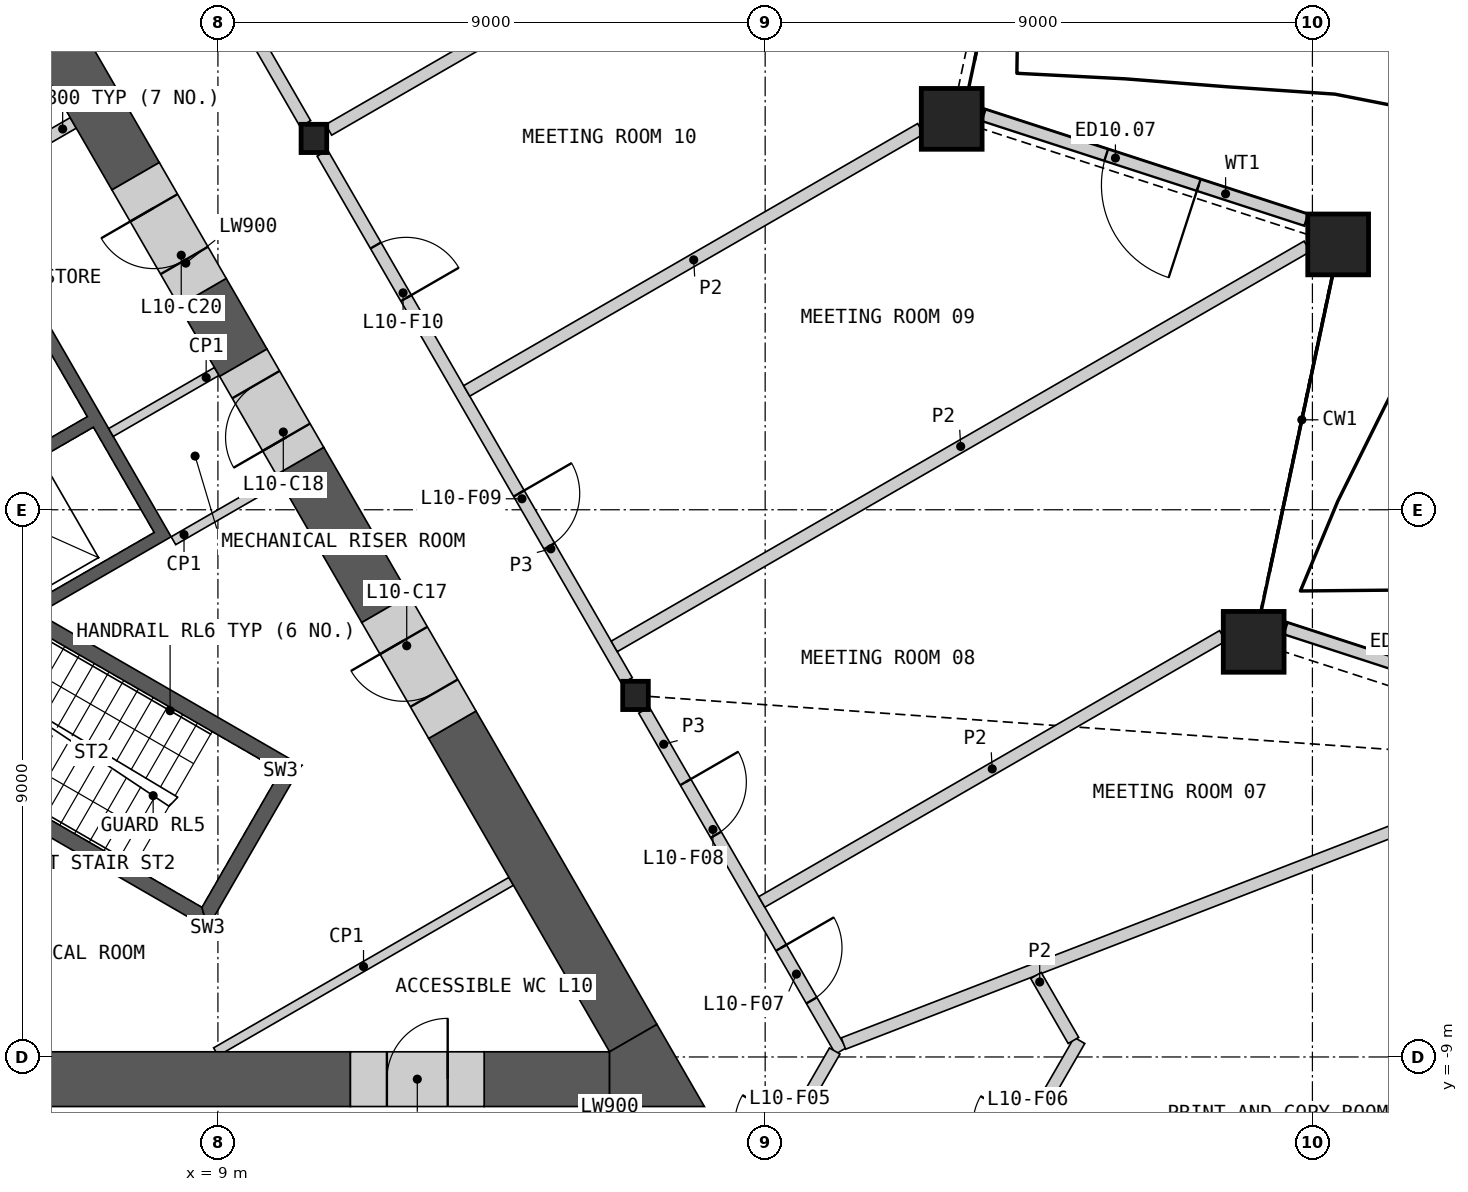
"""IFC4 building model, lengths in metres.
Left out: names, types, materials, properties, quantities, classifications, styles, units other than length and angle.
Written with IfcOpenShell. Run it as: python <this file> out.ifc"""

import sys

from ifc_helpers import new_model, si_unit, direction, frame, frame_2d, origin, origin_2d, place, context, subcontext, project, spatial, polyline, rectangle, hollow_rectangle, i_section, outline, extrude, element, fill, save


model = new_model("IFC4")
c1 = context("Model", 3, precision=1e-05, world=origin(), true_north=direction((0.0, 1.0)))
c2 = subcontext(c1, "Body", "Model", "MODEL_VIEW")
j1 = project(units=[si_unit("LENGTHUNIT", "METRE"), si_unit("PLANEANGLEUNIT", "RADIAN")], contexts=[c1])
p1 = place(None, origin())
s1 = spatial("IfcSite", under=j1, at=p1, CompositionType="ELEMENT")
p2 = place(p1, origin())
s2 = spatial("IfcBuilding", under=s1, at=p2, CompositionType="ELEMENT")
p3 = place(p2, frame((0.0, 0.0, 51.0)))
s3 = spatial("IfcBuildingStorey", under=s2, at=p3, CompositionType="ELEMENT", Elevation=51.0)
for number, where, z_axis, x_axis in (
    (1, (26.034, -2.172, 0.0), (0.0, 0.0, 1.0), (1.0, 0.0, 0.0)),
    (2, (27.423, 4.364, 0.0), (0.0, 0.0, 1.0), (1.0, 0.0, 0.0)),
    (3, (21.068, 6.429, 0.0), (0.0, 0.0, 1.0), (1.0, 0.0, 0.0)),
):
    element("IfcColumn", number, at=place(p3, frame(where, z_axis=z_axis, x_axis=x_axis)), inside=s3, PredefinedType="COLUMN", context=c2, shape_type="SweptSolid", body=[
        extrude(hollow_rectangle(XDim=1.0, YDim=1.0, WallThickness=0.07, at=origin_2d()), origin(), (0.0, 0.0, 1.0), 4.2),
    ])
for number, where, z_axis, x_axis in (
    (4, (15.868, -3.054, 0.0), (0.0, 0.0, 1.0), (1.0, 0.0, 0.0)),
    (5, (10.578, 6.107, 0.0), (0.0, 0.0, 1.0), (1.0, 0.0, 0.0)),
):
    element("IfcColumn", number, at=place(p3, frame(where, z_axis=z_axis, x_axis=x_axis)), inside=s3, PredefinedType="COLUMN", context=c2, shape_type="SweptSolid", body=[
        extrude(i_section(OverallWidth=0.421, OverallDepth=0.465, WebThickness=0.045, FlangeThickness=0.072, at=origin_2d()), origin(), (0.0, 0.0, 1.0), 4.2),
    ])
p4 = place(p3, frame((31.914, -3.693, 0.0), z_axis=(0.0, 0.0, 1.0), x_axis=(-0.951049360908, 0.309039015525, 0.0)))
e6 = element("IfcWall", 6, at=p4, inside=s3, PredefinedType="SOLIDWALL", context=c2, shape_type="SweptSolid", body=[
    extrude(rectangle(XDim=5.631, YDim=0.2, at=frame_2d((2.815, 0.0))), origin(), (0.0, 0.0, 1.0), 3.189),
])
p5 = place(p4, frame((2.031, 0.0, 0.0)))
e7 = element("IfcOpeningElement", 7, at=p5, cuts=e6, PredefinedType="OPENING", context=c2, shape_type="SweptSolid", body=[
    extrude(rectangle(XDim=1.6, YDim=2.4, at=frame_2d((0.8, 1.2))), frame((0.0, 0.11, 0.0), z_axis=(0.0, -1.0, 0.0), x_axis=(1.0, 0.0, 0.0)), (0.0, 0.0, 1.0), 0.22),
])
p6 = place(p3, frame((26.899, 4.765, 0.0), z_axis=(0.0, 0.0, 1.0), x_axis=(-0.951054004345, 0.309024725255, 0.0)))
e8 = element("IfcWall", 8, at=p6, inside=s3, PredefinedType="SOLIDWALL", context=c2, shape_type="SweptSolid", body=[
    extrude(rectangle(XDim=5.579, YDim=0.2, at=frame_2d((2.79, 0.0))), origin(), (0.0, 0.0, 1.0), 3.189),
])
p7 = place(p6, frame((1.86, 0.0, 0.0)))
e9 = element("IfcOpeningElement", 9, at=p7, cuts=e8, PredefinedType="OPENING", context=c2, shape_type="SweptSolid", body=[
    extrude(rectangle(XDim=1.6, YDim=2.4, at=frame_2d((0.8, 1.2))), frame((0.0, 0.11, 0.0), z_axis=(0.0, -1.0, 0.0), x_axis=(1.0, 0.0, 0.0)), (0.0, 0.0, 1.0), 0.22),
])
p8 = place(p3, origin())
e10 = element("IfcWall", 10, at=p8, inside=s3, PredefinedType="SHEAR", context=c2, shape_type="SweptSolid", body=[
    extrude(outline(polyline([(2.66, 4.192), (4.831, 5.445), (8.231, -0.444), (6.061, -1.697), (5.96, -1.524), (7.952, -0.374), (6.952, 1.358), (4.96, 0.208), (4.861, 0.381), (6.852, 1.531), (5.852, 3.263), (3.861, 2.113), (3.76, 2.287), (5.752, 3.437), (4.752, 5.169), (2.76, 4.019), (2.66, 4.192)])), origin(), (0.0, 0.0, 1.0), 3.8),
])
p9 = place(p3, frame((4.881, 5.358, 0.0), z_axis=(0.0, 0.0, 1.0), x_axis=(0.866035824272, 0.499981950752, 0.0)))
e11 = element("IfcWall", 11, at=p9, inside=s3, PredefinedType="SHEAR", context=c2, shape_type="SweptSolid", body=[
    extrude(rectangle(XDim=2.009, YDim=0.2, at=frame_2d((1.004, 0.0))), origin(), (0.0, 0.0, 1.0), 3.8),
])
p10 = place(p3, origin())
e12 = element("IfcWall", 12, at=p10, inside=s3, PredefinedType="SHEAR", context=c2, shape_type="SweptSolid", body=[
    extrude(outline(polyline([(3.763, -3.956), (8.83, -6.881), (8.738, -6.539), (3.888, -3.739), (3.763, -3.956)])), origin(), (0.0, 0.0, 1.0), 3.8),
])
p11 = place(p3, origin())
e13 = element("IfcWall", 13, at=p11, inside=s3, PredefinedType="SHEAR", context=c2, shape_type="SweptSolid", body=[
    extrude(outline(polyline([(8.83, -6.881), (10.374, -4.206), (10.032, -4.298), (8.738, -6.539), (8.83, -6.881)])), origin(), (0.0, 0.0, 1.0), 3.8),
])
p12 = place(p3, origin())
e14 = element("IfcWall", 14, at=p12, inside=s3, PredefinedType="SHEAR", context=c2, shape_type="SweptSolid", body=[
    extrude(outline(polyline([(10.032, -4.298), (10.374, -4.206), (5.307, -1.281), (5.182, -1.498), (10.032, -4.298)])), origin(), (0.0, 0.0, 1.0), 3.8),
])
p13 = place(p3, frame((8.268, -0.509, 0.0), z_axis=(0.0, 0.0, 1.0), x_axis=(0.866035824272, 0.499981950752, 0.0)))
e15 = element("IfcWall", 15, at=p13, inside=s3, PredefinedType="PARTITIONING", context=c2, shape_type="SweptSolid", body=[
    extrude(rectangle(XDim=2.009, YDim=0.15, at=frame_2d((1.004, 0.0))), origin(), (0.0, 0.0, 1.0), 3.8),
])
p14 = place(p3, frame((13.823, -6.111, 0.0), z_axis=(0.0, 0.0, 1.0), x_axis=(-0.866026802741, -0.499997576928, 0.0)))
e16 = element("IfcWall", 16, at=p14, inside=s3, PredefinedType="PARTITIONING", context=c2, shape_type="SweptSolid", body=[
    extrude(rectangle(XDim=5.607, YDim=0.15, at=frame_2d((2.804, 0.0))), origin(), (0.0, 0.0, 1.0), 3.8),
])
p15 = place(p3, frame((8.981, 2.275, 0.0), z_axis=(0.0, 0.0, 1.0), x_axis=(-0.866013584312, -0.500020471368, 0.0)))
e17 = element("IfcWall", 17, at=p15, inside=s3, PredefinedType="PARTITIONING", context=c2, shape_type="SweptSolid", body=[
    extrude(rectangle(XDim=2.009, YDim=0.15, at=frame_2d((1.005, 0.0))), origin(), (0.0, 0.0, 1.0), 3.8),
])
p16 = place(p3, frame((-4.371, -9.365, 0.0), z_axis=(0.0, 0.0, 1.0), x_axis=(1.0, 0.0, 0.0)))
e18 = element("IfcWall", 18, at=p16, inside=s3, PredefinedType="SHEAR", context=c2, shape_type="SweptSolid", body=[
    extrude(rectangle(XDim=15.55, YDim=0.9, at=frame_2d((7.775, 0.0))), origin(), (0.0, 0.0, 1.0), 3.8),
])
p17 = place(p3, frame((13.379, -9.365, 0.0), z_axis=(0.0, 0.0, 1.0), x_axis=(1.0, 0.0, 0.0)))
e19 = element("IfcWall", 19, at=p17, inside=s3, PredefinedType="SHEAR", context=c2, shape_type="SweptSolid", body=[
    extrude(rectangle(XDim=2.062, YDim=0.9, at=frame_2d((1.031, 0.0))), origin(), (0.0, 0.0, 1.0), 3.8),
])
p18 = place(p3, frame((15.831, -8.69, 0.0), z_axis=(0.0, 0.0, 1.0), x_axis=(-0.499999419053, 0.866025739194, 0.0)))
e20 = element("IfcWall", 20, at=p18, inside=s3, PredefinedType="SHEAR", context=c2, shape_type="SweptSolid", body=[
    extrude(rectangle(XDim=5.952, YDim=0.9, at=frame_2d((2.976, 0.0))), origin(), (0.0, 0.0, 1.0), 3.8),
])
p19 = place(p3, frame((7.646, 5.486, 0.0), z_axis=(0.0, 0.0, 1.0), x_axis=(-0.499978218965, 0.866037978706, 0.0)))
e21 = element("IfcWall", 21, at=p19, inside=s3, PredefinedType="SHEAR", context=c2, shape_type="SweptSolid", body=[
    extrude(rectangle(XDim=4.076, YDim=0.9, at=frame_2d((2.038, 0.0))), origin(), (0.0, 0.0, 1.0), 3.8),
])
p20 = place(p3, frame((11.755, -1.63, 0.0), z_axis=(0.0, 0.0, 1.0), x_axis=(-0.499943114462, 0.866058244174, 0.0)))
e22 = element("IfcWall", 22, at=p20, inside=s3, PredefinedType="SHEAR", context=c2, shape_type="SweptSolid", body=[
    extrude(rectangle(XDim=2.809, YDim=0.9, at=frame_2d((1.405, 0.0))), origin(), (0.0, 0.0, 1.0), 3.8),
])
p21 = place(p3, frame((9.418, 2.418, 0.0), z_axis=(0.0, 0.0, 1.0), x_axis=(-0.49995335277, 0.8660523339, 0.0)))
e23 = element("IfcWall", 23, at=p21, inside=s3, PredefinedType="SHEAR", context=c2, shape_type="SweptSolid", body=[
    extrude(rectangle(XDim=1.343, YDim=0.9, at=frame_2d((0.671, 0.0))), origin(), (0.0, 0.0, 1.0), 3.8),
])
p22 = place(p3, origin())
e24 = element("IfcWall", 24, at=p22, inside=s3, PredefinedType="SHEAR", context=c2, shape_type="SweptSolid", body=[
    extrude(outline(polyline([(15.441, -9.815), (15.441, -8.915), (16.221, -8.465), (17.0, -9.815), (15.441, -9.815)])), origin(), (0.0, 0.0, 1.0), 3.8),
])
p23 = place(p3, frame((11.179, -9.365, 0.0), z_axis=(0.0, 0.0, 1.0), x_axis=(1.0, 0.0, 0.0)))
e25 = element("IfcWall", 25, at=p23, inside=s3, PredefinedType="SHEAR", context=c2, shape_type="SweptSolid", body=[
    extrude(rectangle(XDim=2.2, YDim=0.9, at=frame_2d((1.1, 0.0))), origin(), (0.0, 0.0, 1.0), 3.8),
])
p24 = place(p23, frame((0.6, 0.0, 0.0)))
e26 = element("IfcOpeningElement", 26, at=p24, cuts=e25, PredefinedType="OPENING", context=c2, shape_type="SweptSolid", body=[
    extrude(rectangle(XDim=1.0, YDim=2.1, at=frame_2d((0.5, 1.05))), frame((0.0, 0.46, 0.0), z_axis=(0.0, -1.0, 0.0), x_axis=(1.0, 0.0, 0.0)), (0.0, 0.0, 1.0), 0.92),
])
p25 = place(p3, frame((12.855, -3.536, 0.0), z_axis=(0.0, 0.0, 1.0), x_axis=(-0.50002983664, 0.866008176907, 0.0)))
e27 = element("IfcWall", 27, at=p25, inside=s3, PredefinedType="SHEAR", context=c2, shape_type="SweptSolid", body=[
    extrude(rectangle(XDim=2.2, YDim=0.9, at=frame_2d((1.1, 0.0))), origin(), (0.0, 0.0, 1.0), 3.8),
])
p26 = place(p25, frame((0.6, 0.0, 0.0)))
e28 = element("IfcOpeningElement", 28, at=p26, cuts=e27, PredefinedType="OPENING", context=c2, shape_type="SweptSolid", body=[
    extrude(rectangle(XDim=1.0, YDim=2.1, at=frame_2d((0.5, 1.05))), frame((0.0, 0.46, 0.0), z_axis=(0.0, -1.0, 0.0), x_axis=(1.0, 0.0, 0.0)), (0.0, 0.0, 1.0), 0.92),
])
p27 = place(p3, frame((10.35, 0.803, 0.0), z_axis=(0.0, 0.0, 1.0), x_axis=(-0.500081290722, 0.865978465477, 0.0)))
e29 = element("IfcWall", 29, at=p27, inside=s3, PredefinedType="SHEAR", context=c2, shape_type="SweptSolid", body=[
    extrude(rectangle(XDim=1.865, YDim=0.9, at=frame_2d((0.933, 0.0))), origin(), (0.0, 0.0, 1.0), 3.8),
])
p28 = place(p27, frame((0.45, 0.0, 0.0)))
e30 = element("IfcOpeningElement", 30, at=p28, cuts=e29, PredefinedType="OPENING", context=c2, shape_type="SweptSolid", body=[
    extrude(rectangle(XDim=1.0, YDim=2.1, at=frame_2d((0.5, 1.05))), frame((0.0, 0.46, 0.0), z_axis=(0.0, -1.0, 0.0), x_axis=(1.0, 0.0, 0.0)), (0.0, 0.0, 1.0), 0.92),
])
p29 = place(p3, frame((8.747, 3.58, 0.0), z_axis=(0.0, 0.0, 1.0), x_axis=(-0.50002983664, 0.866008176907, 0.0)))
e31 = element("IfcWall", 31, at=p29, inside=s3, PredefinedType="SHEAR", context=c2, shape_type="SweptSolid", body=[
    extrude(rectangle(XDim=2.2, YDim=0.9, at=frame_2d((1.1, 0.0))), origin(), (0.0, 0.0, 1.0), 3.8),
])
p30 = place(p29, frame((0.6, 0.0, 0.0)))
e32 = element("IfcOpeningElement", 32, at=p30, cuts=e31, PredefinedType="OPENING", context=c2, shape_type="SweptSolid", body=[
    extrude(rectangle(XDim=1.0, YDim=2.1, at=frame_2d((0.5, 1.05))), frame((0.0, 0.46, 0.0), z_axis=(0.0, -1.0, 0.0), x_axis=(1.0, 0.0, 0.0)), (0.0, 0.0, 1.0), 0.92),
])
p31 = place(p3, frame((10.719, 5.865, 0.0), z_axis=(0.0, 0.0, 1.0), x_axis=(0.49999175339, -0.866030164915, 0.0)))
e33 = element("IfcWall", 33, at=p31, inside=s3, PredefinedType="PARTITIONING", context=c2, shape_type="SweptSolid", body=[
    extrude(rectangle(XDim=10.019, YDim=0.2, at=frame_2d((5.009, 0.0))), origin(), (0.0, 0.0, 1.0), 3.8),
])
p32 = place(p31, frame((6.464, 0.0, 0.0)))
e34 = element("IfcOpeningElement", 34, at=p32, cuts=e33, PredefinedType="OPENING", context=c2, shape_type="SweptSolid", body=[
    extrude(rectangle(XDim=1.0, YDim=2.1, at=frame_2d((0.5, 1.05))), frame((0.0, 0.11, 0.0), z_axis=(0.0, -1.0, 0.0), x_axis=(1.0, 0.0, 0.0)), (0.0, 0.0, 1.0), 0.22),
])
p33 = place(p31, frame((1.753, 0.0, 0.0)))
e35 = element("IfcOpeningElement", 35, at=p33, cuts=e33, PredefinedType="OPENING", context=c2, shape_type="SweptSolid", body=[
    extrude(rectangle(XDim=1.0, YDim=2.1, at=frame_2d((0.5, 1.05))), frame((0.0, 0.11, 0.0), z_axis=(0.0, -1.0, 0.0), x_axis=(1.0, 0.0, 0.0)), (0.0, 0.0, 1.0), 0.22),
])
p34 = place(p3, frame((5.429, 15.026, 0.0), z_axis=(0.0, 0.0, 1.0), x_axis=(0.50001002959, -0.86601961312, 0.0)))
e36 = element("IfcWall", 36, at=p34, inside=s3, PredefinedType="PARTITIONING", context=c2, shape_type="SweptSolid", body=[
    extrude(rectangle(XDim=10.019, YDim=0.2, at=frame_2d((5.009, 0.0))), origin(), (0.0, 0.0, 1.0), 3.8),
])
p35 = place(p34, frame((4.86, 0.0, 0.0)))
e37 = element("IfcOpeningElement", 37, at=p35, cuts=e36, PredefinedType="OPENING", context=c2, shape_type="SweptSolid", body=[
    extrude(rectangle(XDim=1.0, YDim=2.1, at=frame_2d((0.5, 1.05))), frame((0.0, 0.11, 0.0), z_axis=(0.0, -1.0, 0.0), x_axis=(1.0, 0.0, 0.0)), (0.0, 0.0, 1.0), 0.22),
])
p36 = place(p3, frame((16.008, -3.296, 0.0), z_axis=(0.0, 0.0, 1.0), x_axis=(0.499984737558, -0.86603421538, 0.0)))
e38 = element("IfcWall", 38, at=p36, inside=s3, PredefinedType="PARTITIONING", context=c2, shape_type="SweptSolid", body=[
    extrude(rectangle(XDim=6.473, YDim=0.2, at=frame_2d((3.236, 0.0))), origin(), (0.0, 0.0, 1.0), 3.8),
])
p37 = place(p36, frame((4.512, 0.0, 0.0)))
e39 = element("IfcOpeningElement", 39, at=p37, cuts=e38, PredefinedType="OPENING", context=c2, shape_type="SweptSolid", body=[
    extrude(rectangle(XDim=1.0, YDim=2.1, at=frame_2d((0.5, 1.05))), frame((0.0, 0.11, 0.0), z_axis=(0.0, -1.0, 0.0), x_axis=(1.0, 0.0, 0.0)), (0.0, 0.0, 1.0), 0.22),
])
p38 = place(p36, frame((1.366, 0.0, 0.0)))
e40 = element("IfcOpeningElement", 40, at=p38, cuts=e38, PredefinedType="OPENING", context=c2, shape_type="SweptSolid", body=[
    extrude(rectangle(XDim=1.0, YDim=2.1, at=frame_2d((0.5, 1.05))), frame((0.0, 0.11, 0.0), z_axis=(0.0, -1.0, 0.0), x_axis=(1.0, 0.0, 0.0)), (0.0, 0.0, 1.0), 0.22),
])
p39 = place(p3, frame((17.281, -12.128, 0.0), z_axis=(0.0, 0.0, 1.0), x_axis=(0.499958791762, 0.866049194065, 0.0)))
e41 = element("IfcWall", 41, at=p39, inside=s3, PredefinedType="PARTITIONING", context=c2, shape_type="SweptSolid", body=[
    extrude(rectangle(XDim=3.726, YDim=0.2, at=frame_2d((1.863, 0.0))), origin(), (0.0, 0.0, 1.0), 3.8),
])
p40 = place(p39, frame((1.388, 0.0, 0.0)))
e42 = element("IfcOpeningElement", 42, at=p40, cuts=e41, PredefinedType="OPENING", context=c2, shape_type="SweptSolid", body=[
    extrude(rectangle(XDim=0.95, YDim=2.1, at=frame_2d((0.475, 1.05))), frame((0.0, 0.11, 0.0), z_axis=(0.0, -1.0, 0.0), x_axis=(1.0, 0.0, 0.0)), (0.0, 0.0, 1.0), 0.22),
])
p41 = place(p3, frame((19.287, -8.779, 0.0), z_axis=(0.0, 0.0, 1.0), x_axis=(0.932669586354, 0.360731815467, 0.0)))
e43 = element("IfcWall", 43, at=p41, inside=s3, PredefinedType="PARTITIONING", context=c2, shape_type="SweptSolid", body=[
    extrude(rectangle(XDim=13.501, YDim=0.2, at=frame_2d((6.75, 0.0))), origin(), (0.0, 0.0, 1.0), 2.885),
])
p42 = place(p3, frame((15.518, -2.248, 0.0), z_axis=(0.0, 0.0, 1.0), x_axis=(0.866025231175, 0.500000298968, 0.0)))
e44 = element("IfcWall", 44, at=p42, inside=s3, PredefinedType="PARTITIONING", context=c2, shape_type="SweptSolid", body=[
    extrude(rectangle(XDim=13.159, YDim=0.2, at=frame_2d((6.579, 0.0))), origin(), (0.0, 0.0, 1.0), 2.885),
])
p43 = place(p3, frame((10.821, 6.247, 0.0), z_axis=(0.0, 0.0, 1.0), x_axis=(0.866026729935, 0.499997703033, 0.0)))
e45 = element("IfcWall", 45, at=p43, inside=s3, PredefinedType="PARTITIONING", context=c2, shape_type="SweptSolid", body=[
    extrude(rectangle(XDim=12.848, YDim=0.2, at=frame_2d((6.424, 0.0))), origin(), (0.0, 0.0, 1.0), 2.885),
])
p44 = place(p3, frame((17.944, -6.45, 0.0), z_axis=(0.0, 0.0, 1.0), x_axis=(0.866025328989, 0.50000012955, 0.0)))
e46 = element("IfcWall", 46, at=p44, inside=s3, PredefinedType="PARTITIONING", context=c2, shape_type="SweptSolid", body=[
    extrude(rectangle(XDim=8.752, YDim=0.2, at=frame_2d((4.376, 0.0))), origin(), (0.0, 0.0, 1.0), 2.885),
])
p45 = place(p3, frame((13.091, 1.955, 0.0), z_axis=(0.0, 0.0, 1.0), x_axis=(0.866026670206, 0.499997806488, 0.0)))
e47 = element("IfcWall", 47, at=p45, inside=s3, PredefinedType="PARTITIONING", context=c2, shape_type="SweptSolid", body=[
    extrude(rectangle(XDim=8.622, YDim=0.2, at=frame_2d((4.311, 0.0))), origin(), (0.0, 0.0, 1.0), 2.885),
])
p46 = place(p3, frame((21.297, -11.973, 0.0), z_axis=(0.0, 0.0, 1.0), x_axis=(0.500008291124, 0.866020616849, 0.0)))
e48 = element("IfcWall", 48, at=p46, inside=s3, PredefinedType="PARTITIONING", context=c2, shape_type="SweptSolid", body=[
    extrude(rectangle(XDim=3.746, YDim=0.2, at=frame_2d((1.873, 0.0))), origin(), (0.0, 0.0, 1.0), 2.885),
])
p47 = place(p46, frame((1.189, 0.0, 0.0)))
e49 = element("IfcOpeningElement", 49, at=p47, cuts=e48, PredefinedType="OPENING", context=c2, shape_type="SweptSolid", body=[
    extrude(rectangle(XDim=0.95, YDim=2.1, at=frame_2d((0.475, 1.05))), frame((0.0, 0.11, 0.0), z_axis=(0.0, -1.0, 0.0), x_axis=(1.0, 0.0, 0.0)), (0.0, 0.0, 1.0), 0.22),
])
p48 = place(p3, frame((22.453, -7.66, 0.0), z_axis=(0.0, 0.0, 1.0), x_axis=(0.499928040405, -0.86606694569, 0.0)))
e50 = element("IfcWall", 50, at=p48, inside=s3, PredefinedType="PARTITIONING", context=c2, shape_type="SweptSolid", body=[
    extrude(rectangle(XDim=1.234, YDim=0.2, at=frame_2d((0.617, 0.0))), origin(), (0.0, 0.0, 1.0), 2.885),
])
p49 = place(p7, origin())
e51 = element("IfcDoor", 51, at=p49, inside=s3, OperationType="DOUBLE_DOOR_SINGLE_SWING", PredefinedType="DOOR", context=c2, shape_type="SweptSolid", body=[
    extrude(rectangle(XDim=1.6, YDim=2.4, at=frame_2d((0.8, 1.2))), frame((0.0, 0.025, 0.0), z_axis=(0.0, -1.0, 0.0), x_axis=(1.0, 0.0, 0.0)), (0.0, 0.0, 1.0), 0.05),
])
fill(e9, e51)
p50 = place(p24, origin())
e52 = element("IfcDoor", 52, at=p50, inside=s3, OperationType="SINGLE_SWING_RIGHT", PredefinedType="DOOR", context=c2, shape_type="SweptSolid", body=[
    extrude(rectangle(XDim=1.0, YDim=2.1, at=frame_2d((0.5, 1.05))), frame((0.0, 0.205, 0.0), z_axis=(0.0, -1.0, 0.0), x_axis=(1.0, 0.0, 0.0)), (0.0, 0.0, 1.0), 0.05),
])
fill(e26, e52)
p51 = place(p26, origin())
e53 = element("IfcDoor", 53, at=p51, inside=s3, OperationType="SINGLE_SWING_RIGHT", PredefinedType="DOOR", context=c2, shape_type="SweptSolid", body=[
    extrude(rectangle(XDim=1.0, YDim=2.1, at=frame_2d((0.5, 1.05))), frame((0.0, 0.205, 0.0), z_axis=(0.0, -1.0, 0.0), x_axis=(1.0, 0.0, 0.0)), (0.0, 0.0, 1.0), 0.05),
])
fill(e28, e53)
p52 = place(p28, origin())
e54 = element("IfcDoor", 54, at=p52, inside=s3, OperationType="SINGLE_SWING_LEFT", PredefinedType="DOOR", context=c2, shape_type="SweptSolid", body=[
    extrude(rectangle(XDim=1.0, YDim=2.1, at=frame_2d((0.5, 1.05))), frame((0.0, 0.205, 0.0), z_axis=(0.0, -1.0, 0.0), x_axis=(1.0, 0.0, 0.0)), (0.0, 0.0, 1.0), 0.05),
])
fill(e30, e54)
p53 = place(p30, origin())
e55 = element("IfcDoor", 55, at=p53, inside=s3, OperationType="SINGLE_SWING_RIGHT", PredefinedType="DOOR", context=c2, shape_type="SweptSolid", body=[
    extrude(rectangle(XDim=1.0, YDim=2.1, at=frame_2d((0.5, 1.05))), frame((0.0, 0.205, 0.0), z_axis=(0.0, -1.0, 0.0), x_axis=(1.0, 0.0, 0.0)), (0.0, 0.0, 1.0), 0.05),
])
fill(e32, e55)
p54 = place(p37, origin())
e56 = element("IfcDoor", 56, at=p54, inside=s3, OperationType="SINGLE_SWING_LEFT", PredefinedType="DOOR", context=c2, shape_type="SweptSolid", body=[
    extrude(rectangle(XDim=1.0, YDim=2.1, at=frame_2d((0.5, 1.05))), frame((0.0, 0.025, 0.0), z_axis=(0.0, -1.0, 0.0), x_axis=(1.0, 0.0, 0.0)), (0.0, 0.0, 1.0), 0.05),
])
fill(e39, e56)
p55 = place(p38, origin())
e57 = element("IfcDoor", 57, at=p55, inside=s3, OperationType="SINGLE_SWING_LEFT", PredefinedType="DOOR", context=c2, shape_type="SweptSolid", body=[
    extrude(rectangle(XDim=1.0, YDim=2.1, at=frame_2d((0.5, 1.05))), frame((0.0, 0.025, 0.0), z_axis=(0.0, -1.0, 0.0), x_axis=(1.0, 0.0, 0.0)), (0.0, 0.0, 1.0), 0.05),
])
fill(e40, e57)
p56 = place(p32, origin())
e58 = element("IfcDoor", 58, at=p56, inside=s3, OperationType="SINGLE_SWING_LEFT", PredefinedType="DOOR", context=c2, shape_type="SweptSolid", body=[
    extrude(rectangle(XDim=1.0, YDim=2.1, at=frame_2d((0.5, 1.05))), frame((0.0, 0.025, 0.0), z_axis=(0.0, -1.0, 0.0), x_axis=(1.0, 0.0, 0.0)), (0.0, 0.0, 1.0), 0.05),
])
fill(e34, e58)
p57 = place(p33, origin())
e59 = element("IfcDoor", 59, at=p57, inside=s3, OperationType="SINGLE_SWING_RIGHT", PredefinedType="DOOR", context=c2, shape_type="SweptSolid", body=[
    extrude(rectangle(XDim=1.0, YDim=2.1, at=frame_2d((0.5, 1.05))), frame((0.0, 0.025, 0.0), z_axis=(0.0, -1.0, 0.0), x_axis=(1.0, 0.0, 0.0)), (0.0, 0.0, 1.0), 0.05),
])
fill(e35, e59)
save(model, sys.argv[1])
